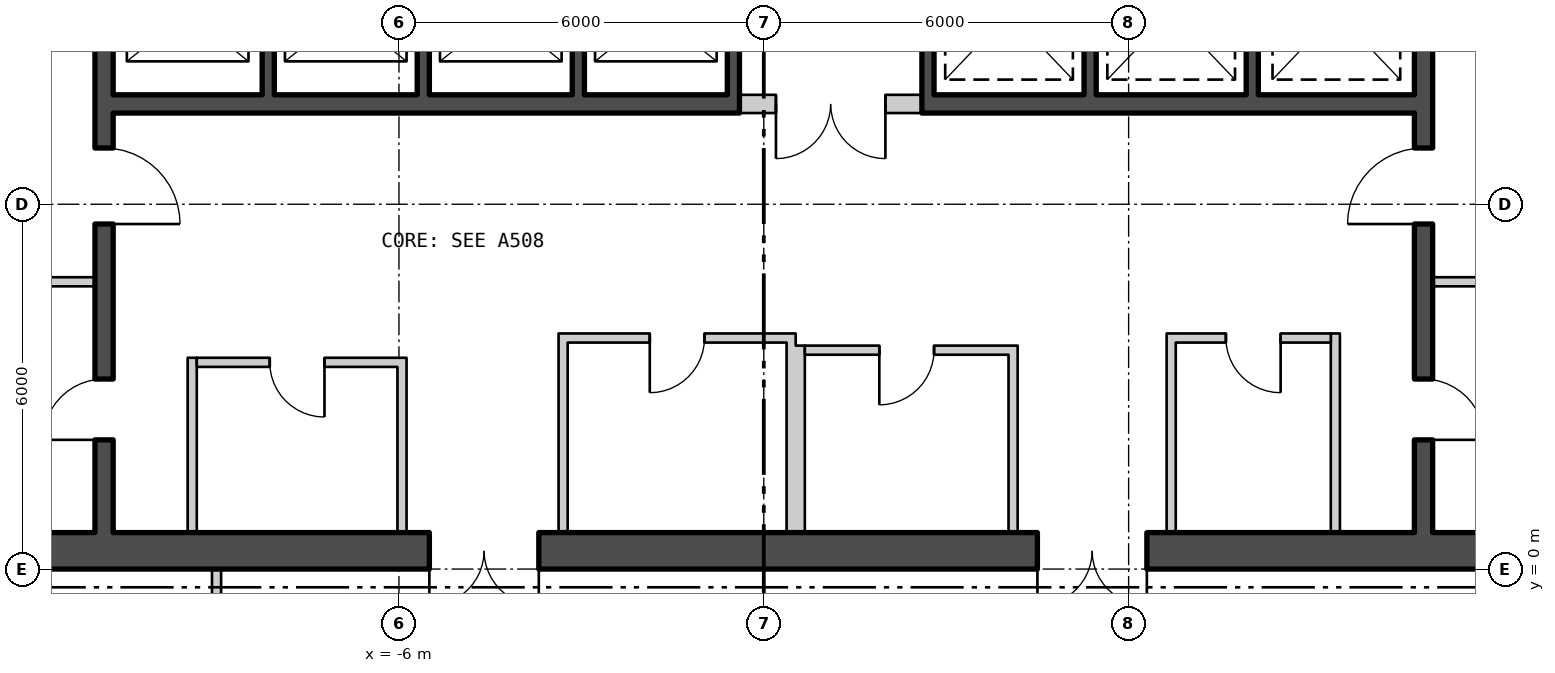
"""IFC4 building model, lengths in metres.
Left out: names, types, materials, properties, quantities, classifications, styles, units other than length and angle.
Written with IfcOpenShell. Run it as: python <this file> out.ifc"""

import sys

from ifc_helpers import new_model, si_unit, direction, frame, frame_2d, origin, place, context, subcontext, project, spatial, rectangle, extrude, element, fill, save


model = new_model("IFC4")
c1 = context("Model", 3, precision=1e-05, world=origin(), true_north=direction((0.0, 1.0)))
c2 = subcontext(c1, "Body", "Model", "MODEL_VIEW")
j1 = project(units=[si_unit("LENGTHUNIT", "METRE"), si_unit("PLANEANGLEUNIT", "RADIAN")], contexts=[c1])
p1 = place(None, origin())
s1 = spatial("IfcSite", under=j1, at=p1, CompositionType="ELEMENT")
p2 = place(p1, origin())
s2 = spatial("IfcBuilding", under=s1, at=p2, CompositionType="ELEMENT")
p3 = place(p2, frame((0.0, 0.0, 23.7)))
s3 = spatial("IfcBuildingStorey", under=s2, at=p3, CompositionType="ELEMENT", Elevation=23.7)
p4 = place(p3, frame((-17.5, 0.3, 0.0), z_axis=(0.0, 0.0, 1.0), x_axis=(1.0, 0.0, 0.0)))
e1 = element("IfcWall", 1, at=p4, inside=s3, PredefinedType="SHEAR", context=c2, shape_type="SweptSolid", body=[
    extrude(rectangle(XDim=35.0, YDim=0.6, at=frame_2d((17.5, 0.0))), origin(), (0.0, 0.0, 1.0), 4.85),
])
p5 = place(p4, frame((12.0, 0.0, 0.0)))
e2 = element("IfcOpeningElement", 2, at=p5, cuts=e1, PredefinedType="OPENING", context=c2, shape_type="SweptSolid", body=[
    extrude(rectangle(XDim=1.8, YDim=2.4, at=frame_2d((0.9, 1.2))), frame((0.0, 0.31, 0.0), z_axis=(0.0, -1.0, 0.0), x_axis=(1.0, 0.0, 0.0)), (0.0, 0.0, 1.0), 0.62),
])
p6 = place(p4, frame((22.0, 0.0, 0.0)))
e3 = element("IfcOpeningElement", 3, at=p6, cuts=e1, PredefinedType="OPENING", context=c2, shape_type="SweptSolid", body=[
    extrude(rectangle(XDim=1.8, YDim=2.4, at=frame_2d((0.9, 1.2))), frame((0.0, 0.31, 0.0), z_axis=(0.0, -1.0, 0.0), x_axis=(1.0, 0.0, 0.0)), (0.0, 0.0, 1.0), 0.62),
])
p7 = place(p3, frame((-10.85, 0.6, 0.0), z_axis=(0.0, 0.0, 1.0), x_axis=(0.0, 1.0, 0.0)))
e4 = element("IfcWall", 4, at=p7, inside=s3, PredefinedType="SHEAR", context=c2, shape_type="SweptSolid", body=[
    extrude(rectangle(XDim=16.8, YDim=0.3, at=frame_2d((8.4, 0.0))), origin(), (0.0, 0.0, 1.0), 4.85),
])
p8 = place(p7, frame((5.075, 0.0, 0.0)))
e5 = element("IfcOpeningElement", 5, at=p8, cuts=e4, PredefinedType="OPENING", context=c2, shape_type="SweptSolid", body=[
    extrude(rectangle(XDim=1.25, YDim=2.1, at=frame_2d((0.625, 1.05))), frame((0.0, 0.16, 0.0), z_axis=(0.0, -1.0, 0.0), x_axis=(1.0, 0.0, 0.0)), (0.0, 0.0, 1.0), 0.32),
])
p9 = place(p7, frame((1.525, 0.0, 0.0)))
e6 = element("IfcOpeningElement", 6, at=p9, cuts=e4, PredefinedType="OPENING", context=c2, shape_type="SweptSolid", body=[
    extrude(rectangle(XDim=1.0, YDim=2.1, at=frame_2d((0.5, 1.05))), frame((0.0, 0.16, 0.0), z_axis=(0.0, -1.0, 0.0), x_axis=(1.0, 0.0, 0.0)), (0.0, 0.0, 1.0), 0.32),
])
p10 = place(p3, frame((10.85, 0.6, 0.0), z_axis=(0.0, 0.0, 1.0), x_axis=(0.0, 1.0, 0.0)))
e7 = element("IfcWall", 7, at=p10, inside=s3, PredefinedType="SHEAR", context=c2, shape_type="SweptSolid", body=[
    extrude(rectangle(XDim=16.8, YDim=0.3, at=frame_2d((8.4, 0.0))), origin(), (0.0, 0.0, 1.0), 4.85),
])
p11 = place(p10, frame((5.075, 0.0, 0.0)))
e8 = element("IfcOpeningElement", 8, at=p11, cuts=e7, PredefinedType="OPENING", context=c2, shape_type="SweptSolid", body=[
    extrude(rectangle(XDim=1.25, YDim=2.1, at=frame_2d((0.625, 1.05))), frame((0.0, 0.16, 0.0), z_axis=(0.0, -1.0, 0.0), x_axis=(1.0, 0.0, 0.0)), (0.0, 0.0, 1.0), 0.32),
])
p12 = place(p10, frame((1.525, 0.0, 0.0)))
e9 = element("IfcOpeningElement", 9, at=p12, cuts=e7, PredefinedType="OPENING", context=c2, shape_type="SweptSolid", body=[
    extrude(rectangle(XDim=1.0, YDim=2.1, at=frame_2d((0.5, 1.05))), frame((0.0, 0.16, 0.0), z_axis=(0.0, -1.0, 0.0), x_axis=(1.0, 0.0, 0.0)), (0.0, 0.0, 1.0), 0.32),
])
p13 = place(p3, frame((-10.7, 7.65, 0.0), z_axis=(0.0, 0.0, 1.0), x_axis=(1.0, 0.0, 0.0)))
e10 = element("IfcWall", 10, at=p13, inside=s3, PredefinedType="SHEAR", context=c2, shape_type="SweptSolid", body=[
    extrude(rectangle(XDim=10.3, YDim=0.3, at=frame_2d((5.15, 0.0))), origin(), (0.0, 0.0, 1.0), 4.85),
])
p14 = place(p3, frame((2.6, 7.65, 0.0), z_axis=(0.0, 0.0, 1.0), x_axis=(1.0, 0.0, 0.0)))
e11 = element("IfcWall", 11, at=p14, inside=s3, PredefinedType="SHEAR", context=c2, shape_type="SweptSolid", body=[
    extrude(rectangle(XDim=8.1, YDim=0.3, at=frame_2d((4.05, 0.0))), origin(), (0.0, 0.0, 1.0), 4.85),
])
for number, where, z_axis, x_axis in (
    (12, (-8.15, 7.8, 0.0), (0.0, 0.0, 1.0), (0.0, 1.0, 0.0)),
    (13, (-5.6, 7.8, 0.0), (0.0, 0.0, 1.0), (0.0, 1.0, 0.0)),
    (14, (-3.05, 7.8, 0.0), (0.0, 0.0, 1.0), (0.0, 1.0, 0.0)),
    (15, (-0.5, 7.8, 0.0), (0.0, 0.0, 1.0), (0.0, 1.0, 0.0)),
    (16, (2.7, 7.8, 0.0), (0.0, 0.0, 1.0), (0.0, 1.0, 0.0)),
    (17, (5.367, 7.8, 0.0), (0.0, 0.0, 1.0), (0.0, 1.0, 0.0)),
    (18, (8.033, 7.8, 0.0), (0.0, 0.0, 1.0), (0.0, 1.0, 0.0)),
):
    element("IfcWall", number, at=place(p3, frame(where, z_axis=z_axis, x_axis=x_axis)), inside=s3, PredefinedType="SHEAR", context=c2, shape_type="SweptSolid", body=[
        extrude(rectangle(XDim=2.7, YDim=0.2, at=frame_2d((1.35, 0.0))), origin(), (0.0, 0.0, 1.0), 4.85),
    ])
for number, where, z_axis, x_axis in (
    (19, (-14.2, 4.725, 0.0), (0.0, 0.0, 1.0), (1.0, 0.0, 0.0)),
    (20, (11.0, 4.725, 0.0), (0.0, 0.0, 1.0), (1.0, 0.0, 0.0)),
):
    element("IfcWall", number, at=place(p3, frame(where, z_axis=z_axis, x_axis=x_axis)), inside=s3, PredefinedType="PARTITIONING", context=c2, shape_type="SweptSolid", body=[
        extrude(rectangle(XDim=3.2, YDim=0.15, at=frame_2d((1.6, 0.0))), origin(), (0.0, 0.0, 1.0), 4.85),
    ])
for number, where, z_axis, x_axis in (
    (21, (-9.4, 0.6, 0.0), (0.0, 0.0, 1.0), (0.0, 1.0, 0.0)),
    (22, (-5.95, 0.6, 0.0), (0.0, 0.0, 1.0), (0.0, 1.0, 0.0)),
):
    element("IfcWall", number, at=place(p3, frame(where, z_axis=z_axis, x_axis=x_axis)), inside=s3, PredefinedType="PARTITIONING", context=c2, shape_type="SweptSolid", body=[
        extrude(rectangle(XDim=2.875, YDim=0.15, at=frame_2d((1.438, 0.0))), origin(), (0.0, 0.0, 1.0), 4.85),
    ])
p15 = place(p3, frame((-9.325, 3.4, 0.0), z_axis=(0.0, 0.0, 1.0), x_axis=(1.0, 0.0, 0.0)))
e23 = element("IfcWall", 23, at=p15, inside=s3, PredefinedType="PARTITIONING", context=c2, shape_type="SweptSolid", body=[
    extrude(rectangle(XDim=3.3, YDim=0.15, at=frame_2d((1.65, 0.0))), origin(), (0.0, 0.0, 1.0), 4.85),
])
p16 = place(p15, frame((1.2, 0.0, 0.0)))
e24 = element("IfcOpeningElement", 24, at=p16, cuts=e23, PredefinedType="OPENING", context=c2, shape_type="SweptSolid", body=[
    extrude(rectangle(XDim=0.9, YDim=2.1, at=frame_2d((0.45, 1.05))), frame((0.0, 0.085, 0.0), z_axis=(0.0, -1.0, 0.0), x_axis=(1.0, 0.0, 0.0)), (0.0, 0.0, 1.0), 0.17),
])
for number, where, z_axis, x_axis in (
    (25, (-3.3, 0.6, 0.0), (0.0, 0.0, 1.0), (0.0, 1.0, 0.0)),
    (26, (0.45, 0.6, 0.0), (0.0, 0.0, 1.0), (0.0, 1.0, 0.0)),
):
    element("IfcWall", number, at=place(p3, frame(where, z_axis=z_axis, x_axis=x_axis)), inside=s3, PredefinedType="PARTITIONING", context=c2, shape_type="SweptSolid", body=[
        extrude(rectangle(XDim=3.275, YDim=0.15, at=frame_2d((1.637, 0.0))), origin(), (0.0, 0.0, 1.0), 4.85),
    ])
p17 = place(p3, frame((-3.225, 3.8, 0.0), z_axis=(0.0, 0.0, 1.0), x_axis=(1.0, 0.0, 0.0)))
e27 = element("IfcWall", 27, at=p17, inside=s3, PredefinedType="PARTITIONING", context=c2, shape_type="SweptSolid", body=[
    extrude(rectangle(XDim=3.6, YDim=0.15, at=frame_2d((1.8, 0.0))), origin(), (0.0, 0.0, 1.0), 4.85),
])
p18 = place(p17, frame((1.35, 0.0, 0.0)))
e28 = element("IfcOpeningElement", 28, at=p18, cuts=e27, PredefinedType="OPENING", context=c2, shape_type="SweptSolid", body=[
    extrude(rectangle(XDim=0.9, YDim=2.1, at=frame_2d((0.45, 1.05))), frame((0.0, 0.085, 0.0), z_axis=(0.0, -1.0, 0.0), x_axis=(1.0, 0.0, 0.0)), (0.0, 0.0, 1.0), 0.17),
])
for number, where, z_axis, x_axis in (
    (29, (0.6, 0.6, 0.0), (0.0, 0.0, 1.0), (0.0, 1.0, 0.0)),
    (30, (4.1, 0.6, 0.0), (0.0, 0.0, 1.0), (0.0, 1.0, 0.0)),
):
    element("IfcWall", number, at=place(p3, frame(where, z_axis=z_axis, x_axis=x_axis)), inside=s3, PredefinedType="PARTITIONING", context=c2, shape_type="SweptSolid", body=[
        extrude(rectangle(XDim=3.075, YDim=0.15, at=frame_2d((1.538, 0.0))), origin(), (0.0, 0.0, 1.0), 4.85),
    ])
p19 = place(p3, frame((0.675, 3.6, 0.0), z_axis=(0.0, 0.0, 1.0), x_axis=(1.0, 0.0, 0.0)))
e31 = element("IfcWall", 31, at=p19, inside=s3, PredefinedType="PARTITIONING", context=c2, shape_type="SweptSolid", body=[
    extrude(rectangle(XDim=3.35, YDim=0.15, at=frame_2d((1.675, 0.0))), origin(), (0.0, 0.0, 1.0), 4.85),
])
p20 = place(p19, frame((1.225, 0.0, 0.0)))
e32 = element("IfcOpeningElement", 32, at=p20, cuts=e31, PredefinedType="OPENING", context=c2, shape_type="SweptSolid", body=[
    extrude(rectangle(XDim=0.9, YDim=2.1, at=frame_2d((0.45, 1.05))), frame((0.0, 0.085, 0.0), z_axis=(0.0, -1.0, 0.0), x_axis=(1.0, 0.0, 0.0)), (0.0, 0.0, 1.0), 0.17),
])
for number, where, z_axis, x_axis in (
    (33, (6.7, 0.6, 0.0), (0.0, 0.0, 1.0), (0.0, 1.0, 0.0)),
    (34, (9.4, 0.6, 0.0), (0.0, 0.0, 1.0), (0.0, 1.0, 0.0)),
):
    element("IfcWall", number, at=place(p3, frame(where, z_axis=z_axis, x_axis=x_axis)), inside=s3, PredefinedType="PARTITIONING", context=c2, shape_type="SweptSolid", body=[
        extrude(rectangle(XDim=3.275, YDim=0.15, at=frame_2d((1.637, 0.0))), origin(), (0.0, 0.0, 1.0), 4.85),
    ])
p21 = place(p3, frame((6.775, 3.8, 0.0), z_axis=(0.0, 0.0, 1.0), x_axis=(1.0, 0.0, 0.0)))
e35 = element("IfcWall", 35, at=p21, inside=s3, PredefinedType="PARTITIONING", context=c2, shape_type="SweptSolid", body=[
    extrude(rectangle(XDim=2.55, YDim=0.15, at=frame_2d((1.275, 0.0))), origin(), (0.0, 0.0, 1.0), 4.85),
])
p22 = place(p21, frame((0.825, 0.0, 0.0)))
e36 = element("IfcOpeningElement", 36, at=p22, cuts=e35, PredefinedType="OPENING", context=c2, shape_type="SweptSolid", body=[
    extrude(rectangle(XDim=0.9, YDim=2.1, at=frame_2d((0.45, 1.05))), frame((0.0, 0.085, 0.0), z_axis=(0.0, -1.0, 0.0), x_axis=(1.0, 0.0, 0.0)), (0.0, 0.0, 1.0), 0.17),
])
p23 = place(p3, frame((-0.4, 7.65, 0.0), z_axis=(0.0, 0.0, 1.0), x_axis=(1.0, 0.0, 0.0)))
e37 = element("IfcWall", 37, at=p23, inside=s3, PredefinedType="PARTITIONING", context=c2, shape_type="SweptSolid", body=[
    extrude(rectangle(XDim=3.0, YDim=0.3, at=frame_2d((1.5, 0.0))), origin(), (0.0, 0.0, 1.0), 4.85),
])
p24 = place(p23, frame((0.6, 0.0, 0.0)))
e38 = element("IfcOpeningElement", 38, at=p24, cuts=e37, PredefinedType="OPENING", context=c2, shape_type="SweptSolid", body=[
    extrude(rectangle(XDim=1.8, YDim=2.4, at=frame_2d((0.9, 1.2))), frame((0.0, 0.16, 0.0), z_axis=(0.0, -1.0, 0.0), x_axis=(1.0, 0.0, 0.0)), (0.0, 0.0, 1.0), 0.32),
])
p25 = place(p3, frame((-9.0, -13.675, 0.0), z_axis=(0.0, 0.0, 1.0), x_axis=(0.0, 1.0, 0.0)))
e39 = element("IfcWall", 39, at=p25, inside=s3, PredefinedType="PARTITIONING", context=c2, shape_type="SweptSolid", body=[
    extrude(rectangle(XDim=13.675, YDim=0.15, at=frame_2d((6.838, 0.0))), origin(), (0.0, 0.0, 1.0), 4.85),
])
p26 = place(p25, frame((11.975, 0.0, 0.0)))
e40 = element("IfcOpeningElement", 40, at=p26, cuts=e39, PredefinedType="OPENING", context=c2, shape_type="SweptSolid", body=[
    extrude(rectangle(XDim=1.0, YDim=2.1, at=frame_2d((0.5, 1.05))), frame((0.0, 0.085, 0.0), z_axis=(0.0, -1.0, 0.0), x_axis=(1.0, 0.0, 0.0)), (0.0, 0.0, 1.0), 0.17),
])
p27 = place(p8, origin())
e41 = element("IfcDoor", 41, at=p27, inside=s3, OperationType="SINGLE_SWING_LEFT", PredefinedType="DOOR", context=c2, shape_type="SweptSolid", body=[
    extrude(rectangle(XDim=1.25, YDim=2.1, at=frame_2d((0.625, 1.05))), frame((0.0, 0.025, 0.0), z_axis=(0.0, -1.0, 0.0), x_axis=(1.0, 0.0, 0.0)), (0.0, 0.0, 1.0), 0.05),
])
fill(e5, e41)
p28 = place(p9, origin())
e42 = element("IfcDoor", 42, at=p28, inside=s3, OperationType="SINGLE_SWING_RIGHT", PredefinedType="DOOR", context=c2, shape_type="SweptSolid", body=[
    extrude(rectangle(XDim=1.0, YDim=2.1, at=frame_2d((0.5, 1.05))), frame((0.0, 0.025, 0.0), z_axis=(0.0, -1.0, 0.0), x_axis=(1.0, 0.0, 0.0)), (0.0, 0.0, 1.0), 0.05),
])
fill(e6, e42)
p29 = place(p11, origin())
e43 = element("IfcDoor", 43, at=p29, inside=s3, OperationType="SINGLE_SWING_RIGHT", PredefinedType="DOOR", context=c2, shape_type="SweptSolid", body=[
    extrude(rectangle(XDim=1.25, YDim=2.1, at=frame_2d((0.625, 1.05))), frame((0.0, 0.025, 0.0), z_axis=(0.0, -1.0, 0.0), x_axis=(1.0, 0.0, 0.0)), (0.0, 0.0, 1.0), 0.05),
])
fill(e8, e43)
p30 = place(p12, origin())
e44 = element("IfcDoor", 44, at=p30, inside=s3, OperationType="SINGLE_SWING_LEFT", PredefinedType="DOOR", context=c2, shape_type="SweptSolid", body=[
    extrude(rectangle(XDim=1.0, YDim=2.1, at=frame_2d((0.5, 1.05))), frame((0.0, 0.025, 0.0), z_axis=(0.0, -1.0, 0.0), x_axis=(1.0, 0.0, 0.0)), (0.0, 0.0, 1.0), 0.05),
])
fill(e9, e44)
p31 = place(p16, origin())
e45 = element("IfcDoor", 45, at=p31, inside=s3, OperationType="SINGLE_SWING_RIGHT", PredefinedType="DOOR", context=c2, shape_type="SweptSolid", body=[
    extrude(rectangle(XDim=0.9, YDim=2.1, at=frame_2d((0.45, 1.05))), frame((0.0, 0.025, 0.0), z_axis=(0.0, -1.0, 0.0), x_axis=(1.0, 0.0, 0.0)), (0.0, 0.0, 1.0), 0.05),
])
fill(e24, e45)
p32 = place(p18, origin())
e46 = element("IfcDoor", 46, at=p32, inside=s3, OperationType="SINGLE_SWING_LEFT", PredefinedType="DOOR", context=c2, shape_type="SweptSolid", body=[
    extrude(rectangle(XDim=0.9, YDim=2.1, at=frame_2d((0.45, 1.05))), frame((0.0, 0.025, 0.0), z_axis=(0.0, -1.0, 0.0), x_axis=(1.0, 0.0, 0.0)), (0.0, 0.0, 1.0), 0.05),
])
fill(e28, e46)
p33 = place(p20, origin())
e47 = element("IfcDoor", 47, at=p33, inside=s3, OperationType="SINGLE_SWING_LEFT", PredefinedType="DOOR", context=c2, shape_type="SweptSolid", body=[
    extrude(rectangle(XDim=0.9, YDim=2.1, at=frame_2d((0.45, 1.05))), frame((0.0, 0.025, 0.0), z_axis=(0.0, -1.0, 0.0), x_axis=(1.0, 0.0, 0.0)), (0.0, 0.0, 1.0), 0.05),
])
fill(e32, e47)
p34 = place(p22, origin())
e48 = element("IfcDoor", 48, at=p34, inside=s3, OperationType="SINGLE_SWING_RIGHT", PredefinedType="DOOR", context=c2, shape_type="SweptSolid", body=[
    extrude(rectangle(XDim=0.9, YDim=2.1, at=frame_2d((0.45, 1.05))), frame((0.0, 0.025, 0.0), z_axis=(0.0, -1.0, 0.0), x_axis=(1.0, 0.0, 0.0)), (0.0, 0.0, 1.0), 0.05),
])
fill(e36, e48)
p35 = place(p24, origin())
e49 = element("IfcDoor", 49, at=p35, inside=s3, OperationType="DOUBLE_DOOR_SINGLE_SWING", PredefinedType="DOOR", context=c2, shape_type="SweptSolid", body=[
    extrude(rectangle(XDim=1.8, YDim=2.4, at=frame_2d((0.9, 1.2))), frame((0.0, 0.025, 0.0), z_axis=(0.0, -1.0, 0.0), x_axis=(1.0, 0.0, 0.0)), (0.0, 0.0, 1.0), 0.05),
])
fill(e38, e49)
p36 = place(p5, origin())
e50 = element("IfcDoor", 50, at=p36, inside=s3, OperationType="DOUBLE_DOOR_SINGLE_SWING", PredefinedType="DOOR", context=c2, shape_type="SweptSolid", body=[
    extrude(rectangle(XDim=1.8, YDim=2.4, at=frame_2d((0.9, 1.2))), frame((0.0, 0.025, 0.0), z_axis=(0.0, -1.0, 0.0), x_axis=(1.0, 0.0, 0.0)), (0.0, 0.0, 1.0), 0.05),
])
fill(e2, e50)
p37 = place(p6, origin())
e51 = element("IfcDoor", 51, at=p37, inside=s3, OperationType="DOUBLE_DOOR_SINGLE_SWING", PredefinedType="DOOR", context=c2, shape_type="SweptSolid", body=[
    extrude(rectangle(XDim=1.8, YDim=2.4, at=frame_2d((0.9, 1.2))), frame((0.0, 0.025, 0.0), z_axis=(0.0, -1.0, 0.0), x_axis=(1.0, 0.0, 0.0)), (0.0, 0.0, 1.0), 0.05),
])
fill(e3, e51)
save(model, sys.argv[1])
